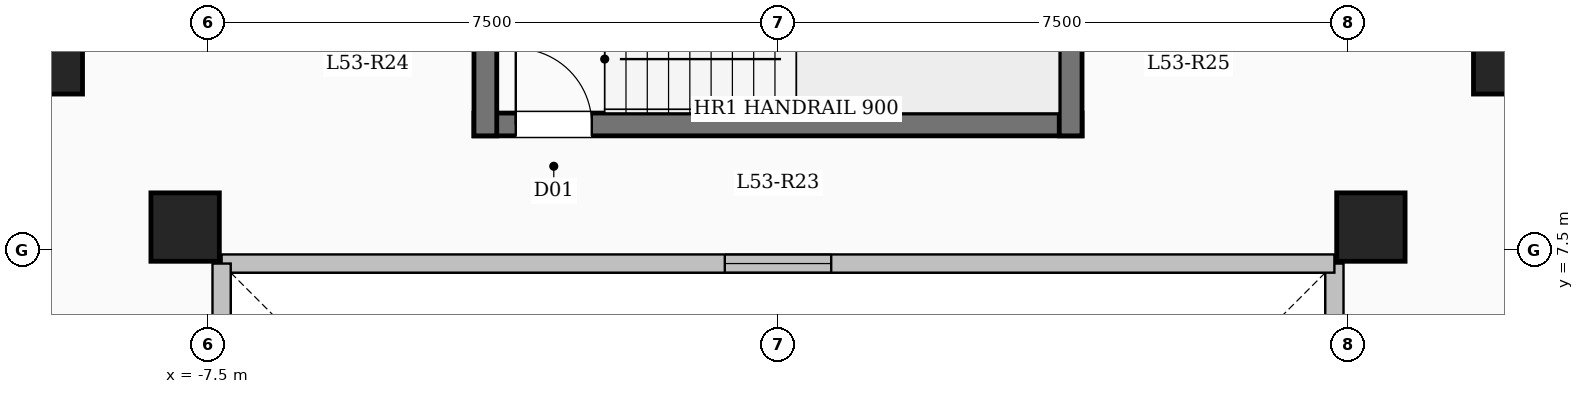
"""IFC4 building model, lengths in metres.
Left out: names, types, materials, properties, quantities, classifications, styles, units other than length and angle.
Written with IfcOpenShell. Run it as: python <this file> out.ifc"""

import sys

from ifc_helpers import new_model, si_unit, direction, frame, frame_2d, origin, origin_2d, place, context, subcontext, project, spatial, rectangle, extrude, element, fill, save


model = new_model("IFC4")
c1 = context("Model", 3, precision=1e-05, world=origin(), true_north=direction((0.0, 1.0)))
c2 = subcontext(c1, "Body", "Model", "MODEL_VIEW")
j1 = project(units=[si_unit("LENGTHUNIT", "METRE"), si_unit("PLANEANGLEUNIT", "RADIAN")], contexts=[c1])
p1 = place(None, origin())
s1 = spatial("IfcSite", under=j1, at=p1, CompositionType="ELEMENT")
p2 = place(p1, origin())
s2 = spatial("IfcBuilding", under=s1, at=p2, CompositionType="ELEMENT")
p3 = place(p2, frame((0.0, 0.0, 196.95)))
s3 = spatial("IfcBuildingStorey", under=s2, at=p3, CompositionType="ELEMENT", Elevation=196.95)
for number, where, z_axis, x_axis in (
    (1, (-7.8, 7.8, 0.0), (0.0, 0.0, 1.0), (1.0, 0.0, 0.0)),
    (2, (7.8, 7.8, 0.0), (0.0, 0.0, 1.0), (1.0, 0.0, 0.0)),
    (3, (-9.6, 10.0, 0.0), (0.0, 0.0, 1.0), (1.0, 0.0, 0.0)),
    (4, (9.6, 10.0, 0.0), (0.0, 0.0, 1.0), (1.0, 0.0, 0.0)),
):
    element("IfcColumn", number, at=place(p3, frame(where, z_axis=z_axis, x_axis=x_axis)), inside=s3, PredefinedType="COLUMN", context=c2, shape_type="SweptSolid", body=[
        extrude(rectangle(XDim=0.9, YDim=0.9, at=origin_2d()), origin(), (0.0, 0.0, 1.0), 3.35),
    ])
p4 = place(p3, frame((7.32, -7.32, 0.0), z_axis=(0.0, 0.0, 1.0), x_axis=(0.0, 1.0, 0.0)))
e5 = element("IfcWall", 5, at=p4, inside=s3, PredefinedType="SOLIDWALL", context=c2, shape_type="SweptSolid", body=[
    extrude(rectangle(XDim=14.64, YDim=0.24, at=frame_2d((7.32, 0.0))), origin(), (0.0, 0.0, 1.0), 3.1),
])
p5 = place(p4, frame((6.62, 0.0, 0.95)))
e6 = element("IfcOpeningElement", 6, at=p5, cuts=e5, PredefinedType="OPENING", context=c2, shape_type="SweptSolid", body=[
    extrude(rectangle(XDim=1.4, YDim=1.5, at=frame_2d((0.7, 0.75))), frame((0.0, 0.13, 0.0), z_axis=(0.0, -1.0, 0.0), x_axis=(1.0, 0.0, 0.0)), (0.0, 0.0, 1.0), 0.26),
])
p6 = place(p3, frame((7.32, 7.32, 0.0), z_axis=(0.0, 0.0, 1.0), x_axis=(-1.0, 0.0, 0.0)))
e7 = element("IfcWall", 7, at=p6, inside=s3, PredefinedType="SOLIDWALL", context=c2, shape_type="SweptSolid", body=[
    extrude(rectangle(XDim=14.64, YDim=0.24, at=frame_2d((7.32, 0.0))), origin(), (0.0, 0.0, 1.0), 3.1),
])
p7 = place(p6, frame((6.62, 0.0, 0.95)))
e8 = element("IfcOpeningElement", 8, at=p7, cuts=e7, PredefinedType="OPENING", context=c2, shape_type="SweptSolid", body=[
    extrude(rectangle(XDim=1.4, YDim=1.5, at=frame_2d((0.7, 0.75))), frame((0.0, 0.13, 0.0), z_axis=(0.0, -1.0, 0.0), x_axis=(1.0, 0.0, 0.0)), (0.0, 0.0, 1.0), 0.26),
])
p8 = place(p3, frame((-7.32, 7.32, 0.0), z_axis=(0.0, 0.0, 1.0), x_axis=(0.0, -1.0, 0.0)))
e9 = element("IfcWall", 9, at=p8, inside=s3, PredefinedType="SOLIDWALL", context=c2, shape_type="SweptSolid", body=[
    extrude(rectangle(XDim=14.64, YDim=0.24, at=frame_2d((7.32, 0.0))), origin(), (0.0, 0.0, 1.0), 3.1),
])
p9 = place(p8, frame((6.62, 0.0, 0.95)))
e10 = element("IfcOpeningElement", 10, at=p9, cuts=e9, PredefinedType="OPENING", context=c2, shape_type="SweptSolid", body=[
    extrude(rectangle(XDim=1.4, YDim=1.5, at=frame_2d((0.7, 0.75))), frame((0.0, 0.13, 0.0), z_axis=(0.0, -1.0, 0.0), x_axis=(1.0, 0.0, 0.0)), (0.0, 0.0, 1.0), 0.26),
])
p10 = place(p3, frame((-4.0, 9.15, 0.0), z_axis=(0.0, 0.0, 1.0), x_axis=(1.0, 0.0, 0.0)))
e11 = element("IfcWall", 11, at=p10, inside=s3, PredefinedType="SHEAR", context=c2, shape_type="SweptSolid", body=[
    extrude(rectangle(XDim=8.0, YDim=0.3, at=frame_2d((4.0, 0.0))), origin(), (0.0, 0.0, 1.0), 3.35),
])
p11 = place(p10, frame((0.55, 0.0, 0.0)))
e12 = element("IfcOpeningElement", 12, at=p11, cuts=e11, PredefinedType="OPENING", context=c2, shape_type="SweptSolid", body=[
    extrude(rectangle(XDim=1.0, YDim=2.15, at=frame_2d((0.5, 1.075))), frame((0.0, 0.16, 0.0), z_axis=(0.0, -1.0, 0.0), x_axis=(1.0, 0.0, 0.0)), (0.0, 0.0, 1.0), 0.32),
])
for number, where, z_axis, x_axis in (
    (13, (-3.85, 9.0, 0.0), (0.0, 0.0, 1.0), (0.0, 1.0, 0.0)),
    (14, (3.85, 9.0, 0.0), (0.0, 0.0, 1.0), (0.0, 1.0, 0.0)),
):
    element("IfcWall", number, at=place(p3, frame(where, z_axis=z_axis, x_axis=x_axis)), inside=s3, PredefinedType="SHEAR", context=c2, shape_type="SweptSolid", body=[
        extrude(rectangle(XDim=3.59, YDim=0.3, at=frame_2d((1.795, 0.0))), origin(), (0.0, 0.0, 1.0), 3.35),
    ])
p12 = place(p7, origin())
e15 = element("IfcWindow", 15, at=p12, inside=s3, PartitioningType="SINGLE_PANEL", PredefinedType="WINDOW", context=c2, shape_type="SweptSolid", body=[
    extrude(rectangle(XDim=1.4, YDim=1.5, at=frame_2d((0.7, 0.75))), frame((0.0, 0.03, 0.0), z_axis=(0.0, -1.0, 0.0), x_axis=(1.0, 0.0, 0.0)), (0.0, 0.0, 1.0), 0.06),
])
fill(e8, e15)
p13 = place(p11, origin())
e16 = element("IfcDoor", 16, at=p13, inside=s3, OperationType="SINGLE_SWING_LEFT", PredefinedType="DOOR", context=c2, shape_type="SweptSolid", body=[
    extrude(rectangle(XDim=1.0, YDim=2.15, at=frame_2d((0.5, 1.075))), frame((0.0, 0.025, 0.0), z_axis=(0.0, -1.0, 0.0), x_axis=(1.0, 0.0, 0.0)), (0.0, 0.0, 1.0), 0.05),
])
fill(e12, e16)
save(model, sys.argv[1])
